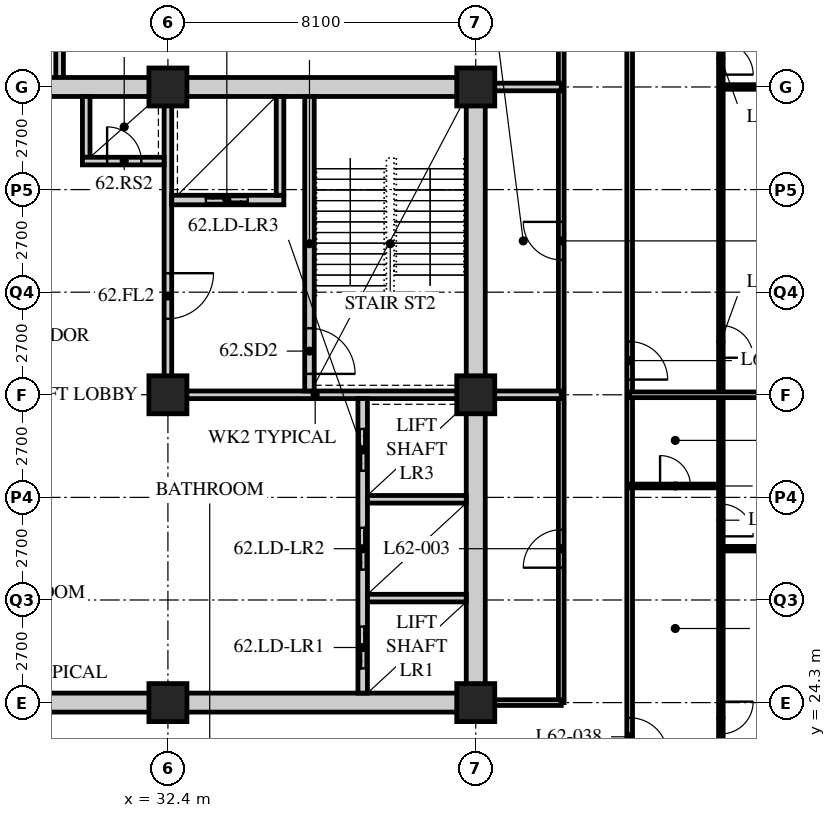
"""IFC4 building model, lengths in metres.
Left out: names, types, materials, properties, quantities, classifications, styles, units other than length and angle.
Written with IfcOpenShell. Run it as: python <this file> out.ifc"""

import sys

from ifc_helpers import new_model, si_unit, direction, frame, frame_2d, origin, origin_2d, place, context, subcontext, project, spatial, rectangle, hollow_rectangle, extrude, element, fill, save


model = new_model("IFC4")
c1 = context("Model", 3, precision=1e-05, world=origin(), true_north=direction((0.0, 1.0)))
c2 = subcontext(c1, "Body", "Model", "MODEL_VIEW")
j1 = project(units=[si_unit("LENGTHUNIT", "METRE"), si_unit("PLANEANGLEUNIT", "RADIAN")], contexts=[c1])
p1 = place(None, origin())
s1 = spatial("IfcSite", under=j1, at=p1, CompositionType="ELEMENT")
p2 = place(p1, origin())
s2 = spatial("IfcBuilding", under=s1, at=p2, CompositionType="ELEMENT")
p3 = place(p2, frame((0.0, 0.0, 242.4)))
s3 = spatial("IfcBuildingStorey", under=s2, at=p3, CompositionType="ELEMENT", Elevation=242.4)
for number, where, z_axis, x_axis in (
    (1, (32.4, 24.3, 0.0), (0.0, 0.0, 1.0), (1.0, 0.0, 0.0)),
    (2, (32.4, 32.4, 0.0), (0.0, 0.0, 1.0), (1.0, 0.0, 0.0)),
    (3, (32.4, 40.5, 0.0), (0.0, 0.0, 1.0), (1.0, 0.0, 0.0)),
    (4, (40.5, 24.3, 0.0), (0.0, 0.0, 1.0), (1.0, 0.0, 0.0)),
    (5, (40.5, 32.4, 0.0), (0.0, 0.0, 1.0), (1.0, 0.0, 0.0)),
    (6, (40.5, 40.5, 0.0), (0.0, 0.0, 1.0), (1.0, 0.0, 0.0)),
):
    element("IfcColumn", number, at=place(p3, frame(where, z_axis=z_axis, x_axis=x_axis)), inside=s3, PredefinedType="COLUMN", context=c2, shape_type="SweptSolid", body=[
        extrude(hollow_rectangle(XDim=1.0, YDim=1.0, WallThickness=0.1, at=origin_2d()), origin(), (0.0, 0.0, 1.0), 3.9),
    ])
p4 = place(p3, frame((44.55, 22.5, 0.0), z_axis=(0.0, 0.0, 1.0), x_axis=(0.0, 1.0, 0.0)))
e7 = element("IfcWall", 7, at=p4, inside=s3, PredefinedType="PARTITIONING", context=c2, shape_type="SweptSolid", body=[
    extrude(rectangle(XDim=26.1, YDim=0.15, at=frame_2d((13.05, 0.0))), origin(), (0.0, 0.0, 1.0), 3.69),
])
p5 = place(p4, frame((0.4, 0.0, 0.0)))
e8 = element("IfcOpeningElement", 8, at=p5, cuts=e7, PredefinedType="OPENING", context=c2, shape_type="SweptSolid", body=[
    extrude(rectangle(XDim=1.0, YDim=2.1, at=frame_2d((0.5, 1.05))), frame((0.0, 0.085, 0.0), z_axis=(0.0, -1.0, 0.0), x_axis=(1.0, 0.0, 0.0)), (0.0, 0.0, 1.0), 0.17),
])
p6 = place(p4, frame((10.3, 0.0, 0.0)))
e9 = element("IfcOpeningElement", 9, at=p6, cuts=e7, PredefinedType="OPENING", context=c2, shape_type="SweptSolid", body=[
    extrude(rectangle(XDim=1.0, YDim=2.1, at=frame_2d((0.5, 1.05))), frame((0.0, 0.085, 0.0), z_axis=(0.0, -1.0, 0.0), x_axis=(1.0, 0.0, 0.0)), (0.0, 0.0, 1.0), 0.17),
])
p7 = place(p3, frame((42.75, 24.3, 0.0), z_axis=(0.0, 0.0, 1.0), x_axis=(0.0, 1.0, 0.0)))
e10 = element("IfcWall", 10, at=p7, inside=s3, PredefinedType="PARTITIONING", context=c2, shape_type="SweptSolid", body=[
    extrude(rectangle(XDim=22.5, YDim=0.15, at=frame_2d((11.25, 0.0))), origin(), (0.0, 0.0, 1.0), 3.69),
])
p8 = place(p7, frame((3.55, 0.0, 0.0)))
e11 = element("IfcOpeningElement", 11, at=p8, cuts=e10, PredefinedType="OPENING", context=c2, shape_type="SweptSolid", body=[
    extrude(rectangle(XDim=1.0, YDim=2.1, at=frame_2d((0.5, 1.05))), frame((0.0, 0.085, 0.0), z_axis=(0.0, -1.0, 0.0), x_axis=(1.0, 0.0, 0.0)), (0.0, 0.0, 1.0), 0.17),
])
p9 = place(p7, frame((11.65, 0.0, 0.0)))
e12 = element("IfcOpeningElement", 12, at=p9, cuts=e10, PredefinedType="OPENING", context=c2, shape_type="SweptSolid", body=[
    extrude(rectangle(XDim=1.0, YDim=2.1, at=frame_2d((0.5, 1.05))), frame((0.0, 0.085, 0.0), z_axis=(0.0, -1.0, 0.0), x_axis=(1.0, 0.0, 0.0)), (0.0, 0.0, 1.0), 0.17),
])
p10 = place(p3, frame((40.7, 24.3, 0.0), z_axis=(0.0, 0.0, 1.0), x_axis=(1.0, 0.0, 0.0)))
e13 = element("IfcWall", 13, at=p10, inside=s3, PredefinedType="PARTITIONING", context=c2, shape_type="SweptSolid", body=[
    extrude(rectangle(XDim=2.05, YDim=0.15, at=frame_2d((1.025, 0.0))), origin(), (0.0, 0.0, 1.0), 2.928),
])
p11 = place(p3, frame((40.5, 32.4, 0.0), z_axis=(0.0, 0.0, 1.0), x_axis=(1.0, 0.0, 0.0)))
e14 = element("IfcWall", 14, at=p11, inside=s3, PredefinedType="SOLIDWALL", context=c2, shape_type="SweptSolid", body=[
    extrude(rectangle(XDim=2.25, YDim=0.2, at=frame_2d((1.125, 0.0))), origin(), (0.0, 0.0, 1.0), 2.928),
])
p12 = place(p3, frame((29.55, 40.5, 0.0), z_axis=(0.0, 0.0, 1.0), x_axis=(0.0, 1.0, 0.0)))
e15 = element("IfcWall", 15, at=p12, inside=s3, PredefinedType="SOLIDWALL", context=c2, shape_type="SweptSolid", body=[
    extrude(rectangle(XDim=6.3, YDim=0.2, at=frame_2d((3.15, 0.0))), origin(), (0.0, 0.0, 1.0), 3.69),
])
p13 = place(p3, frame((40.5, 40.5, 0.0), z_axis=(0.0, 0.0, 1.0), x_axis=(1.0, 0.0, 0.0)))
e16 = element("IfcWall", 16, at=p13, inside=s3, PredefinedType="SOLIDWALL", context=c2, shape_type="SweptSolid", body=[
    extrude(rectangle(XDim=2.25, YDim=0.2, at=frame_2d((1.125, 0.0))), origin(), (0.0, 0.0, 1.0), 2.928),
])
p14 = place(p3, frame((46.95, 22.5, 0.0), z_axis=(0.0, 0.0, 1.0), x_axis=(0.0, 1.0, 0.0)))
e17 = element("IfcWall", 17, at=p14, inside=s3, PredefinedType="PARTITIONING", context=c2, shape_type="SweptSolid", body=[
    extrude(rectangle(XDim=26.1, YDim=0.12, at=frame_2d((13.05, 0.0))), origin(), (0.0, 0.0, 1.0), 3.69),
])
p15 = place(p14, frame((0.975, 0.0, 0.0)))
e18 = element("IfcOpeningElement", 18, at=p15, cuts=e17, PredefinedType="OPENING", context=c2, shape_type="SweptSolid", body=[
    extrude(rectangle(XDim=0.85, YDim=2.1, at=frame_2d((0.425, 1.05))), frame((0.0, 0.07, 0.0), z_axis=(0.0, -1.0, 0.0), x_axis=(1.0, 0.0, 0.0)), (0.0, 0.0, 1.0), 0.14),
])
p16 = place(p14, frame((6.175, 0.0, 0.0)))
e19 = element("IfcOpeningElement", 19, at=p16, cuts=e17, PredefinedType="OPENING", context=c2, shape_type="SweptSolid", body=[
    extrude(rectangle(XDim=0.85, YDim=2.1, at=frame_2d((0.425, 1.05))), frame((0.0, 0.07, 0.0), z_axis=(0.0, -1.0, 0.0), x_axis=(1.0, 0.0, 0.0)), (0.0, 0.0, 1.0), 0.14),
])
p17 = place(p14, frame((10.875, 0.0, 0.0)))
e20 = element("IfcOpeningElement", 20, at=p17, cuts=e17, PredefinedType="OPENING", context=c2, shape_type="SweptSolid", body=[
    extrude(rectangle(XDim=0.85, YDim=2.1, at=frame_2d((0.425, 1.05))), frame((0.0, 0.07, 0.0), z_axis=(0.0, -1.0, 0.0), x_axis=(1.0, 0.0, 0.0)), (0.0, 0.0, 1.0), 0.14),
])
p18 = place(p14, frame((18.325, 0.0, 0.0)))
e21 = element("IfcOpeningElement", 21, at=p18, cuts=e17, PredefinedType="OPENING", context=c2, shape_type="SweptSolid", body=[
    extrude(rectangle(XDim=0.85, YDim=2.1, at=frame_2d((0.425, 1.05))), frame((0.0, 0.07, 0.0), z_axis=(0.0, -1.0, 0.0), x_axis=(1.0, 0.0, 0.0)), (0.0, 0.0, 1.0), 0.14),
])
p19 = place(p14, frame((22.375, 0.0, 0.0)))
e22 = element("IfcOpeningElement", 22, at=p19, cuts=e17, PredefinedType="OPENING", context=c2, shape_type="SweptSolid", body=[
    extrude(rectangle(XDim=0.85, YDim=2.1, at=frame_2d((0.425, 1.05))), frame((0.0, 0.07, 0.0), z_axis=(0.0, -1.0, 0.0), x_axis=(1.0, 0.0, 0.0)), (0.0, 0.0, 1.0), 0.14),
])
p20 = place(p3, frame((44.55, 30.0, 0.0), z_axis=(0.0, 0.0, 1.0), x_axis=(1.0, 0.0, 0.0)))
e23 = element("IfcWall", 23, at=p20, inside=s3, PredefinedType="PARTITIONING", context=c2, shape_type="SweptSolid", body=[
    extrude(rectangle(XDim=2.4, YDim=0.1, at=frame_2d((1.2, 0.0))), origin(), (0.0, 0.0, 1.0), 3.69),
])
p21 = place(p20, frame((0.8, 0.0, 0.0)))
e24 = element("IfcOpeningElement", 24, at=p21, cuts=e23, PredefinedType="OPENING", context=c2, shape_type="SweptSolid", body=[
    extrude(rectangle(XDim=0.8, YDim=2.1, at=frame_2d((0.4, 1.05))), frame((0.0, 0.06, 0.0), z_axis=(0.0, -1.0, 0.0), x_axis=(1.0, 0.0, 0.0)), (0.0, 0.0, 1.0), 0.12),
])
p22 = place(p3, frame((46.95, 28.35, 0.0), z_axis=(0.0, 0.0, 1.0), x_axis=(1.0, 0.0, 0.0)))
e25 = element("IfcWall", 25, at=p22, inside=s3, PredefinedType="PARTITIONING", context=c2, shape_type="SweptSolid", body=[
    extrude(rectangle(XDim=9.45, YDim=0.12, at=frame_2d((4.725, 0.0))), origin(), (0.0, 0.0, 1.0), 3.69),
])
p23 = place(p3, frame((44.55, 32.4, 0.0), z_axis=(0.0, 0.0, 1.0), x_axis=(1.0, 0.0, 0.0)))
e26 = element("IfcWall", 26, at=p23, inside=s3, PredefinedType="PARTITIONING", context=c2, shape_type="SweptSolid", body=[
    extrude(rectangle(XDim=11.85, YDim=0.15, at=frame_2d((5.925, 0.0))), origin(), (0.0, 0.0, 1.0), 2.928),
])
p24 = place(p3, frame((46.95, 40.5, 0.0), z_axis=(0.0, 0.0, 1.0), x_axis=(1.0, 0.0, 0.0)))
e27 = element("IfcWall", 27, at=p24, inside=s3, PredefinedType="PARTITIONING", context=c2, shape_type="SweptSolid", body=[
    extrude(rectangle(XDim=9.45, YDim=0.12, at=frame_2d((4.725, 0.0))), origin(), (0.0, 0.0, 1.0), 2.928),
])
p25 = place(p3, frame((15.95, 24.3, 0.0), z_axis=(0.0, 0.0, 1.0), x_axis=(1.0, 0.0, 0.0)))
e28 = element("IfcWall", 28, at=p25, inside=s3, PredefinedType="SOLIDWALL", context=c2, shape_type="SweptSolid", body=[
    extrude(rectangle(XDim=24.8, YDim=0.5, at=frame_2d((12.4, 0.0))), origin(), (0.0, 0.0, 1.0), 2.928),
])
p26 = place(p25, frame((11.5, 0.0, 0.0)))
e29 = element("IfcOpeningElement", 29, at=p26, cuts=e28, PredefinedType="OPENING", context=c2, shape_type="SweptSolid", body=[
    extrude(rectangle(XDim=1.8, YDim=2.4, at=frame_2d((0.9, 1.2))), frame((0.0, 0.26, 0.0), z_axis=(0.0, -1.0, 0.0), x_axis=(1.0, 0.0, 0.0)), (0.0, 0.0, 1.0), 0.52),
])
p27 = place(p3, frame((15.95, 40.5, 0.0), z_axis=(0.0, 0.0, 1.0), x_axis=(1.0, 0.0, 0.0)))
e30 = element("IfcWall", 30, at=p27, inside=s3, PredefinedType="SOLIDWALL", context=c2, shape_type="SweptSolid", body=[
    extrude(rectangle(XDim=24.8, YDim=0.5, at=frame_2d((12.4, 0.0))), origin(), (0.0, 0.0, 1.0), 2.928),
])
p28 = place(p27, frame((11.5, 0.0, 0.0)))
e31 = element("IfcOpeningElement", 31, at=p28, cuts=e30, PredefinedType="OPENING", context=c2, shape_type="SweptSolid", body=[
    extrude(rectangle(XDim=1.8, YDim=2.4, at=frame_2d((0.9, 1.2))), frame((0.0, 0.26, 0.0), z_axis=(0.0, -1.0, 0.0), x_axis=(1.0, 0.0, 0.0)), (0.0, 0.0, 1.0), 0.52),
])
p29 = place(p3, frame((40.5, 24.55, 0.0), z_axis=(0.0, 0.0, 1.0), x_axis=(0.0, 1.0, 0.0)))
e32 = element("IfcWall", 32, at=p29, inside=s3, PredefinedType="SOLIDWALL", context=c2, shape_type="SweptSolid", body=[
    extrude(rectangle(XDim=15.7, YDim=0.5, at=frame_2d((7.85, 0.0))), origin(), (0.0, 0.0, 1.0), 2.928),
])
p30 = place(p3, frame((32.3, 32.4, 0.0), z_axis=(0.0, 0.0, 1.0), x_axis=(1.0, 0.0, 0.0)))
e33 = element("IfcWall", 33, at=p30, inside=s3, PredefinedType="SOLIDWALL", context=c2, shape_type="SweptSolid", body=[
    extrude(rectangle(XDim=7.95, YDim=0.2, at=frame_2d((3.975, 0.0))), origin(), (0.0, 0.0, 1.0), 3.078),
])
p31 = place(p3, frame((32.4, 32.5, 0.0), z_axis=(0.0, 0.0, 1.0), x_axis=(0.0, 1.0, 0.0)))
e34 = element("IfcWall", 34, at=p31, inside=s3, PredefinedType="SOLIDWALL", context=c2, shape_type="SweptSolid", body=[
    extrude(rectangle(XDim=7.75, YDim=0.2, at=frame_2d((3.875, 0.0))), origin(), (0.0, 0.0, 1.0), 3.078),
])
p32 = place(p31, frame((1.9, 0.0, 0.0)))
e35 = element("IfcOpeningElement", 35, at=p32, cuts=e34, PredefinedType="OPENING", context=c2, shape_type="SweptSolid", body=[
    extrude(rectangle(XDim=1.2, YDim=2.1, at=frame_2d((0.6, 1.05))), frame((0.0, 0.11, 0.0), z_axis=(0.0, -1.0, 0.0), x_axis=(1.0, 0.0, 0.0)), (0.0, 0.0, 1.0), 0.22),
])
p33 = place(p3, frame((37.525, 24.55, 0.0), z_axis=(0.0, 0.0, 1.0), x_axis=(0.0, 1.0, 0.0)))
e36 = element("IfcWall", 36, at=p33, inside=s3, PredefinedType="SOLIDWALL", context=c2, shape_type="SweptSolid", body=[
    extrude(rectangle(XDim=7.75, YDim=0.25, at=frame_2d((3.875, 0.0))), origin(), (0.0, 0.0, 1.0), 3.69),
])
p34 = place(p33, frame((0.65, 0.0, 0.0)))
e37 = element("IfcOpeningElement", 37, at=p34, cuts=e36, PredefinedType="OPENING", context=c2, shape_type="SweptSolid", body=[
    extrude(rectangle(XDim=1.1, YDim=2.4, at=frame_2d((0.55, 1.2))), frame((0.0, 0.135, 0.0), z_axis=(0.0, -1.0, 0.0), x_axis=(1.0, 0.0, 0.0)), (0.0, 0.0, 1.0), 0.27),
])
p35 = place(p33, frame((3.25, 0.0, 0.0)))
e38 = element("IfcOpeningElement", 38, at=p35, cuts=e36, PredefinedType="OPENING", context=c2, shape_type="SweptSolid", body=[
    extrude(rectangle(XDim=1.1, YDim=2.4, at=frame_2d((0.55, 1.2))), frame((0.0, 0.135, 0.0), z_axis=(0.0, -1.0, 0.0), x_axis=(1.0, 0.0, 0.0)), (0.0, 0.0, 1.0), 0.27),
])
p36 = place(p33, frame((5.85, 0.0, 0.0)))
e39 = element("IfcOpeningElement", 39, at=p36, cuts=e36, PredefinedType="OPENING", context=c2, shape_type="SweptSolid", body=[
    extrude(rectangle(XDim=1.1, YDim=2.4, at=frame_2d((0.55, 1.2))), frame((0.0, 0.135, 0.0), z_axis=(0.0, -1.0, 0.0), x_axis=(1.0, 0.0, 0.0)), (0.0, 0.0, 1.0), 0.27),
])
for number, where, z_axis, x_axis in (
    (40, (37.65, 27.05, 0.0), (0.0, 0.0, 1.0), (1.0, 0.0, 0.0)),
    (41, (37.65, 29.65, 0.0), (0.0, 0.0, 1.0), (1.0, 0.0, 0.0)),
):
    element("IfcWall", number, at=place(p3, frame(where, z_axis=z_axis, x_axis=x_axis)), inside=s3, PredefinedType="SOLIDWALL", context=c2, shape_type="SweptSolid", body=[
        extrude(rectangle(XDim=2.6, YDim=0.2, at=frame_2d((1.3, 0.0))), origin(), (0.0, 0.0, 1.0), 3.69),
    ])
p37 = place(p3, frame((36.125, 32.5, 0.0), z_axis=(0.0, 0.0, 1.0), x_axis=(0.0, 1.0, 0.0)))
e42 = element("IfcWall", 42, at=p37, inside=s3, PredefinedType="SOLIDWALL", context=c2, shape_type="SweptSolid", body=[
    extrude(rectangle(XDim=7.75, YDim=0.25, at=frame_2d((3.875, 0.0))), origin(), (0.0, 0.0, 1.0), 3.69),
])
p38 = place(p37, frame((0.45, 0.0, 0.0)))
e43 = element("IfcOpeningElement", 43, at=p38, cuts=e42, PredefinedType="OPENING", context=c2, shape_type="SweptSolid", body=[
    extrude(rectangle(XDim=1.2, YDim=2.1, at=frame_2d((0.6, 1.05))), frame((0.0, 0.135, 0.0), z_axis=(0.0, -1.0, 0.0), x_axis=(1.0, 0.0, 0.0)), (0.0, 0.0, 1.0), 0.27),
])
p39 = place(p3, frame((32.5, 37.525, 0.0), z_axis=(0.0, 0.0, 1.0), x_axis=(1.0, 0.0, 0.0)))
e44 = element("IfcWall", 44, at=p39, inside=s3, PredefinedType="SOLIDWALL", context=c2, shape_type="SweptSolid", body=[
    extrude(rectangle(XDim=2.95, YDim=0.25, at=frame_2d((1.475, 0.0))), origin(), (0.0, 0.0, 1.0), 3.69),
])
p40 = place(p39, frame((0.9, 0.0, 0.0)))
e45 = element("IfcOpeningElement", 45, at=p40, cuts=e44, PredefinedType="OPENING", context=c2, shape_type="SweptSolid", body=[
    extrude(rectangle(XDim=1.1, YDim=2.4, at=frame_2d((0.55, 1.2))), frame((0.0, 0.135, 0.0), z_axis=(0.0, -1.0, 0.0), x_axis=(1.0, 0.0, 0.0)), (0.0, 0.0, 1.0), 0.27),
])
p41 = place(p3, frame((35.35, 37.65, 0.0), z_axis=(0.0, 0.0, 1.0), x_axis=(0.0, 1.0, 0.0)))
e46 = element("IfcWall", 46, at=p41, inside=s3, PredefinedType="SOLIDWALL", context=c2, shape_type="SweptSolid", body=[
    extrude(rectangle(XDim=2.6, YDim=0.2, at=frame_2d((1.3, 0.0))), origin(), (0.0, 0.0, 1.0), 3.69),
])
p42 = place(p3, frame((30.25, 38.65, 0.0), z_axis=(0.0, 0.0, 1.0), x_axis=(0.0, 1.0, 0.0)))
e47 = element("IfcWall", 47, at=p42, inside=s3, PredefinedType="SOLIDWALL", context=c2, shape_type="SweptSolid", body=[
    extrude(rectangle(XDim=1.6, YDim=0.2, at=frame_2d((0.8, 0.0))), origin(), (0.0, 0.0, 1.0), 3.69),
])
p43 = place(p3, frame((30.15, 38.55, 0.0), z_axis=(0.0, 0.0, 1.0), x_axis=(1.0, 0.0, 0.0)))
e48 = element("IfcWall", 48, at=p43, inside=s3, PredefinedType="SOLIDWALL", context=c2, shape_type="SweptSolid", body=[
    extrude(rectangle(XDim=2.15, YDim=0.2, at=frame_2d((1.075, 0.0))), origin(), (0.0, 0.0, 1.0), 3.69),
])
p44 = place(p43, frame((0.65, 0.0, 0.0)))
e49 = element("IfcOpeningElement", 49, at=p44, cuts=e48, PredefinedType="OPENING", context=c2, shape_type="SweptSolid", body=[
    extrude(rectangle(XDim=0.9, YDim=2.1, at=frame_2d((0.45, 1.05))), frame((0.0, 0.11, 0.0), z_axis=(0.0, -1.0, 0.0), x_axis=(1.0, 0.0, 0.0)), (0.0, 0.0, 1.0), 0.22),
])
p45 = place(p8, origin())
e50 = element("IfcDoor", 50, at=p45, inside=s3, OperationType="SINGLE_SWING_LEFT", PredefinedType="DOOR", context=c2, shape_type="SweptSolid", body=[
    extrude(rectangle(XDim=1.0, YDim=2.1, at=frame_2d((0.5, 1.05))), frame((0.0, 0.025, 0.0), z_axis=(0.0, -1.0, 0.0), x_axis=(1.0, 0.0, 0.0)), (0.0, 0.0, 1.0), 0.05),
])
fill(e11, e50)
p46 = place(p9, origin())
e51 = element("IfcDoor", 51, at=p46, inside=s3, OperationType="SINGLE_SWING_RIGHT", PredefinedType="DOOR", context=c2, shape_type="SweptSolid", body=[
    extrude(rectangle(XDim=1.0, YDim=2.1, at=frame_2d((0.5, 1.05))), frame((0.0, 0.025, 0.0), z_axis=(0.0, -1.0, 0.0), x_axis=(1.0, 0.0, 0.0)), (0.0, 0.0, 1.0), 0.05),
])
fill(e12, e51)
p47 = place(p21, origin())
e52 = element("IfcDoor", 52, at=p47, inside=s3, OperationType="SINGLE_SWING_LEFT", PredefinedType="DOOR", context=c2, shape_type="SweptSolid", body=[
    extrude(rectangle(XDim=0.8, YDim=2.1, at=frame_2d((0.4, 1.05))), frame((0.0, 0.025, 0.0), z_axis=(0.0, -1.0, 0.0), x_axis=(1.0, 0.0, 0.0)), (0.0, 0.0, 1.0), 0.05),
])
fill(e24, e52)
p48 = place(p5, origin())
e53 = element("IfcDoor", 53, at=p48, inside=s3, OperationType="SINGLE_SWING_RIGHT", PredefinedType="DOOR", context=c2, shape_type="SweptSolid", body=[
    extrude(rectangle(XDim=1.0, YDim=2.1, at=frame_2d((0.5, 1.05))), frame((0.0, 0.025, 0.0), z_axis=(0.0, -1.0, 0.0), x_axis=(1.0, 0.0, 0.0)), (0.0, 0.0, 1.0), 0.05),
])
fill(e8, e53)
p49 = place(p15, origin())
e54 = element("IfcDoor", 54, at=p49, inside=s3, OperationType="SINGLE_SWING_LEFT", PredefinedType="DOOR", context=c2, shape_type="SweptSolid", body=[
    extrude(rectangle(XDim=0.85, YDim=2.1, at=frame_2d((0.425, 1.05))), frame((0.0, 0.025, 0.0), z_axis=(0.0, -1.0, 0.0), x_axis=(1.0, 0.0, 0.0)), (0.0, 0.0, 1.0), 0.05),
])
fill(e18, e54)
p50 = place(p16, origin())
e55 = element("IfcDoor", 55, at=p50, inside=s3, OperationType="SINGLE_SWING_RIGHT", PredefinedType="DOOR", context=c2, shape_type="SweptSolid", body=[
    extrude(rectangle(XDim=0.85, YDim=2.1, at=frame_2d((0.425, 1.05))), frame((0.0, 0.025, 0.0), z_axis=(0.0, -1.0, 0.0), x_axis=(1.0, 0.0, 0.0)), (0.0, 0.0, 1.0), 0.05),
])
fill(e19, e55)
p51 = place(p6, origin())
e56 = element("IfcDoor", 56, at=p51, inside=s3, OperationType="SINGLE_SWING_RIGHT", PredefinedType="DOOR", context=c2, shape_type="SweptSolid", body=[
    extrude(rectangle(XDim=1.0, YDim=2.1, at=frame_2d((0.5, 1.05))), frame((0.0, 0.025, 0.0), z_axis=(0.0, -1.0, 0.0), x_axis=(1.0, 0.0, 0.0)), (0.0, 0.0, 1.0), 0.05),
])
fill(e9, e56)
p52 = place(p17, origin())
e57 = element("IfcDoor", 57, at=p52, inside=s3, OperationType="SINGLE_SWING_RIGHT", PredefinedType="DOOR", context=c2, shape_type="SweptSolid", body=[
    extrude(rectangle(XDim=0.85, YDim=2.1, at=frame_2d((0.425, 1.05))), frame((0.0, 0.025, 0.0), z_axis=(0.0, -1.0, 0.0), x_axis=(1.0, 0.0, 0.0)), (0.0, 0.0, 1.0), 0.05),
])
fill(e20, e57)
p53 = place(p18, origin())
e58 = element("IfcDoor", 58, at=p53, inside=s3, OperationType="SINGLE_SWING_RIGHT", PredefinedType="DOOR", context=c2, shape_type="SweptSolid", body=[
    extrude(rectangle(XDim=0.85, YDim=2.1, at=frame_2d((0.425, 1.05))), frame((0.0, 0.025, 0.0), z_axis=(0.0, -1.0, 0.0), x_axis=(1.0, 0.0, 0.0)), (0.0, 0.0, 1.0), 0.05),
])
fill(e21, e58)
p54 = place(p38, origin())
e59 = element("IfcDoor", 59, at=p54, inside=s3, OperationType="SINGLE_SWING_RIGHT", PredefinedType="DOOR", context=c2, shape_type="SweptSolid", body=[
    extrude(rectangle(XDim=1.2, YDim=2.1, at=frame_2d((0.6, 1.05))), frame((0.0, 0.025, 0.0), z_axis=(0.0, -1.0, 0.0), x_axis=(1.0, 0.0, 0.0)), (0.0, 0.0, 1.0), 0.05),
])
fill(e43, e59)
p55 = place(p32, origin())
e60 = element("IfcDoor", 60, at=p55, inside=s3, OperationType="SINGLE_SWING_LEFT", PredefinedType="DOOR", context=c2, shape_type="SweptSolid", body=[
    extrude(rectangle(XDim=1.2, YDim=2.1, at=frame_2d((0.6, 1.05))), frame((0.0, 0.025, 0.0), z_axis=(0.0, -1.0, 0.0), x_axis=(1.0, 0.0, 0.0)), (0.0, 0.0, 1.0), 0.05),
])
fill(e35, e60)
p56 = place(p44, origin())
e61 = element("IfcDoor", 61, at=p56, inside=s3, OperationType="SINGLE_SWING_LEFT", PredefinedType="DOOR", context=c2, shape_type="SweptSolid", body=[
    extrude(rectangle(XDim=0.9, YDim=2.1, at=frame_2d((0.45, 1.05))), frame((0.0, 0.025, 0.0), z_axis=(0.0, -1.0, 0.0), x_axis=(1.0, 0.0, 0.0)), (0.0, 0.0, 1.0), 0.05),
])
fill(e49, e61)
p57 = place(p34, origin())
e62 = element("IfcDoor", 62, at=p57, inside=s3, OperationType="DOUBLE_DOOR_SLIDING", PredefinedType="DOOR", context=c2, shape_type="SweptSolid", body=[
    extrude(rectangle(XDim=1.1, YDim=2.4, at=frame_2d((0.55, 1.2))), frame((0.0, 0.025, 0.0), z_axis=(0.0, -1.0, 0.0), x_axis=(1.0, 0.0, 0.0)), (0.0, 0.0, 1.0), 0.05),
])
fill(e37, e62)
p58 = place(p35, origin())
e63 = element("IfcDoor", 63, at=p58, inside=s3, OperationType="DOUBLE_DOOR_SLIDING", PredefinedType="DOOR", context=c2, shape_type="SweptSolid", body=[
    extrude(rectangle(XDim=1.1, YDim=2.4, at=frame_2d((0.55, 1.2))), frame((0.0, 0.025, 0.0), z_axis=(0.0, -1.0, 0.0), x_axis=(1.0, 0.0, 0.0)), (0.0, 0.0, 1.0), 0.05),
])
fill(e38, e63)
p59 = place(p36, origin())
e64 = element("IfcDoor", 64, at=p59, inside=s3, OperationType="DOUBLE_DOOR_SLIDING", PredefinedType="DOOR", context=c2, shape_type="SweptSolid", body=[
    extrude(rectangle(XDim=1.1, YDim=2.4, at=frame_2d((0.55, 1.2))), frame((0.0, 0.025, 0.0), z_axis=(0.0, -1.0, 0.0), x_axis=(1.0, 0.0, 0.0)), (0.0, 0.0, 1.0), 0.05),
])
fill(e39, e64)
p60 = place(p40, origin())
e65 = element("IfcDoor", 65, at=p60, inside=s3, OperationType="DOUBLE_DOOR_SLIDING", PredefinedType="DOOR", context=c2, shape_type="SweptSolid", body=[
    extrude(rectangle(XDim=1.1, YDim=2.4, at=frame_2d((0.55, 1.2))), frame((0.0, 0.025, 0.0), z_axis=(0.0, -1.0, 0.0), x_axis=(1.0, 0.0, 0.0)), (0.0, 0.0, 1.0), 0.05),
])
fill(e45, e65)
save(model, sys.argv[1])
